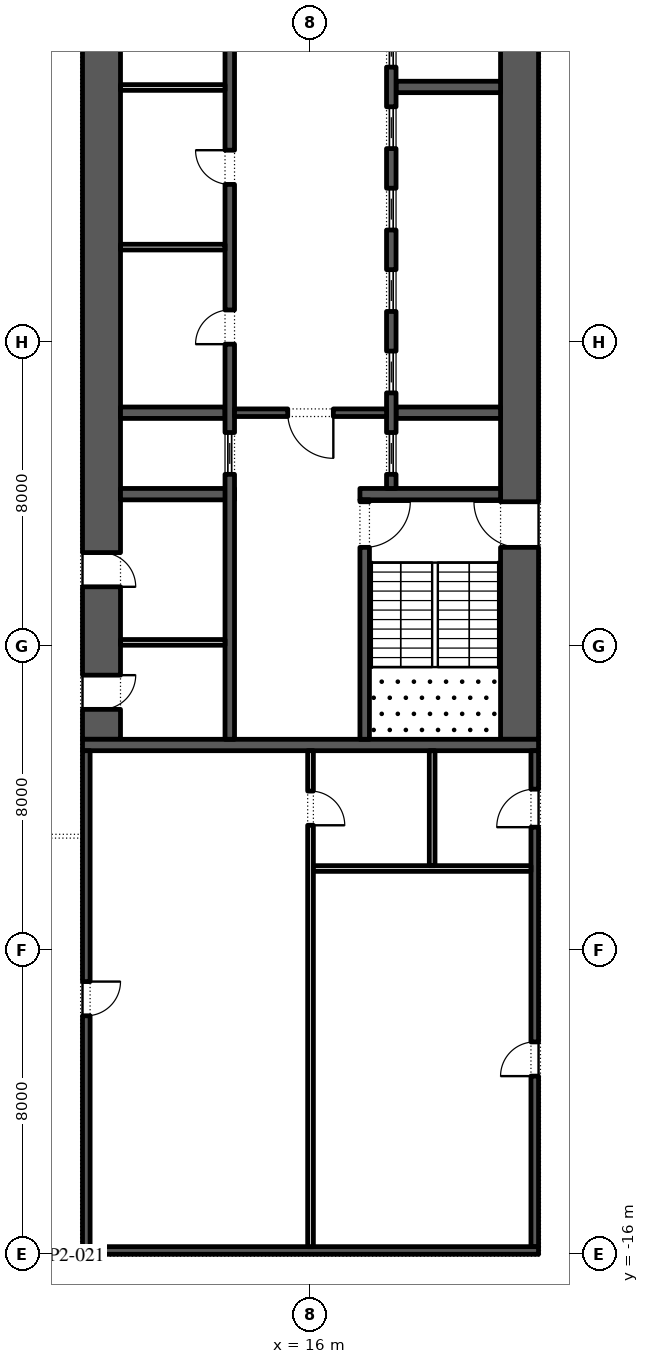
"""IFC4 building model, lengths in metres.
Left out: names, types, materials, properties, quantities, classifications, styles, units other than length and angle.
Written with IfcOpenShell. Run it as: python <this file> out.ifc"""

import sys

from ifc_helpers import new_model, si_unit, direction, frame, frame_2d, origin, place, context, subcontext, project, spatial, rectangle, extrude, element, fill, save


model = new_model("IFC4")
c1 = context("Model", 3, precision=1e-05, world=origin(), true_north=direction((0.0, 1.0)))
c2 = subcontext(c1, "Body", "Model", "MODEL_VIEW")
j1 = project(units=[si_unit("LENGTHUNIT", "METRE"), si_unit("PLANEANGLEUNIT", "RADIAN")], contexts=[c1])
p1 = place(None, origin())
s1 = spatial("IfcSite", under=j1, at=p1, CompositionType="ELEMENT")
p2 = place(p1, origin())
s2 = spatial("IfcBuilding", under=s1, at=p2, CompositionType="ELEMENT")
p3 = place(p2, frame((0.0, 0.0, 81.6)))
s3 = spatial("IfcBuildingStorey", under=s2, at=p3, CompositionType="ELEMENT", Elevation=81.6)
p4 = place(p3, frame((21.5, -2.45, 0.0), z_axis=(0.0, 0.0, 1.0), x_axis=(0.0, 1.0, 0.0)))
e1 = element("IfcWall", 1, at=p4, inside=s3, PredefinedType="SHEAR", context=c2, shape_type="SweptSolid", body=[
    extrude(rectangle(XDim=27.9, YDim=1.0, at=frame_2d((13.95, 0.0))), origin(), (0.0, 0.0, 1.0), 4.0),
])
p5 = place(p4, frame((5.05, 0.0, 0.0)))
e2 = element("IfcOpeningElement", 2, at=p5, cuts=e1, PredefinedType="OPENING", context=c2, shape_type="SweptSolid", body=[
    extrude(rectangle(XDim=1.2, YDim=2.1, at=frame_2d((0.6, 1.05))), frame((0.0, 0.51, 0.0), z_axis=(0.0, -1.0, 0.0), x_axis=(1.0, 0.0, 0.0)), (0.0, 0.0, 1.0), 1.02),
])
p6 = place(p4, frame((21.65, 0.0, 0.0)))
e3 = element("IfcOpeningElement", 3, at=p6, cuts=e1, PredefinedType="OPENING", context=c2, shape_type="SweptSolid", body=[
    extrude(rectangle(XDim=1.2, YDim=2.1, at=frame_2d((0.6, 1.05))), frame((0.0, 0.51, 0.0), z_axis=(0.0, -1.0, 0.0), x_axis=(1.0, 0.0, 0.0)), (0.0, 0.0, 1.0), 1.02),
])
p7 = place(p3, frame((10.5, -2.45, 0.0), z_axis=(0.0, 0.0, 1.0), x_axis=(0.0, 1.0, 0.0)))
e4 = element("IfcWall", 4, at=p7, inside=s3, PredefinedType="SHEAR", context=c2, shape_type="SweptSolid", body=[
    extrude(rectangle(XDim=27.9, YDim=1.0, at=frame_2d((13.95, 0.0))), origin(), (0.0, 0.0, 1.0), 4.0),
])
p8 = place(p7, frame((23.65, 0.0, 0.0)))
e5 = element("IfcOpeningElement", 5, at=p8, cuts=e4, PredefinedType="OPENING", context=c2, shape_type="SweptSolid", body=[
    extrude(rectangle(XDim=2.4, YDim=2.1, at=frame_2d((1.2, 1.05))), frame((0.0, 0.51, 0.0), z_axis=(0.0, -1.0, 0.0), x_axis=(1.0, 0.0, 0.0)), (0.0, 0.0, 1.0), 1.02),
])
p9 = place(p7, frame((0.788, 0.0, 0.0)))
e6 = element("IfcOpeningElement", 6, at=p9, cuts=e4, PredefinedType="OPENING", context=c2, shape_type="SweptSolid", body=[
    extrude(rectangle(XDim=0.9, YDim=2.1, at=frame_2d((0.45, 1.05))), frame((0.0, 0.51, 0.0), z_axis=(0.0, -1.0, 0.0), x_axis=(1.0, 0.0, 0.0)), (0.0, 0.0, 1.0), 1.02),
])
p10 = place(p7, frame((4.012, 0.0, 0.0)))
e7 = element("IfcOpeningElement", 7, at=p10, cuts=e4, PredefinedType="OPENING", context=c2, shape_type="SweptSolid", body=[
    extrude(rectangle(XDim=0.9, YDim=2.1, at=frame_2d((0.45, 1.05))), frame((0.0, 0.51, 0.0), z_axis=(0.0, -1.0, 0.0), x_axis=(1.0, 0.0, 0.0)), (0.0, 0.0, 1.0), 1.02),
])
p11 = place(p3, frame((10.0, -2.6, 0.0), z_axis=(0.0, 0.0, 1.0), x_axis=(1.0, 0.0, 0.0)))
e8 = element("IfcWall", 8, at=p11, inside=s3, PredefinedType="SHEAR", context=c2, shape_type="SweptSolid", body=[
    extrude(rectangle(XDim=12.0, YDim=0.3, at=frame_2d((6.0, 0.0))), origin(), (0.0, 0.0, 1.0), 4.0),
])
p12 = place(p3, frame((17.3, 4.0, 0.0), z_axis=(0.0, 0.0, 1.0), x_axis=(1.0, 0.0, 0.0)))
e9 = element("IfcWall", 9, at=p12, inside=s3, PredefinedType="SHEAR", context=c2, shape_type="SweptSolid", body=[
    extrude(rectangle(XDim=3.7, YDim=0.3, at=frame_2d((1.85, 0.0))), origin(), (0.0, 0.0, 1.0), 4.0),
])
p13 = place(p3, frame((17.425, -2.45, 0.0), z_axis=(0.0, 0.0, 1.0), x_axis=(0.0, 1.0, 0.0)))
e10 = element("IfcWall", 10, at=p13, inside=s3, PredefinedType="SHEAR", context=c2, shape_type="SweptSolid", body=[
    extrude(rectangle(XDim=6.3, YDim=0.25, at=frame_2d((3.15, 0.0))), origin(), (0.0, 0.0, 1.0), 4.0),
])
p14 = place(p13, frame((5.05, 0.0, 0.0)))
e11 = element("IfcOpeningElement", 11, at=p14, cuts=e10, PredefinedType="OPENING", context=c2, shape_type="SweptSolid", body=[
    extrude(rectangle(XDim=1.2, YDim=2.1, at=frame_2d((0.6, 1.05))), frame((0.0, 0.135, 0.0), z_axis=(0.0, -1.0, 0.0), x_axis=(1.0, 0.0, 0.0)), (0.0, 0.0, 1.0), 0.27),
])
for number, where, z_axis, x_axis in (
    (12, (18.25, 6.143, 0.0), (0.0, 0.0, 1.0), (1.0, 0.0, 0.0)),
    (13, (18.25, 14.714, 0.0), (0.0, 0.0, 1.0), (1.0, 0.0, 0.0)),
):
    element("IfcWall", number, at=place(p3, frame(where, z_axis=z_axis, x_axis=x_axis)), inside=s3, PredefinedType="SHEAR", context=c2, shape_type="SweptSolid", body=[
        extrude(rectangle(XDim=2.75, YDim=0.3, at=frame_2d((1.375, 0.0))), origin(), (0.0, 0.0, 1.0), 4.0),
    ])
p15 = place(p3, frame((18.125, 4.15, 0.0), z_axis=(0.0, 0.0, 1.0), x_axis=(0.0, 1.0, 0.0)))
e14 = element("IfcWall", 14, at=p15, inside=s3, PredefinedType="SHEAR", context=c2, shape_type="SweptSolid", body=[
    extrude(rectangle(XDim=14.7, YDim=0.25, at=frame_2d((7.35, 0.0))), origin(), (0.0, 0.0, 1.0), 4.0),
])
p16 = place(p15, frame((0.371, 0.0, 0.0)))
e15 = element("IfcOpeningElement", 15, at=p16, cuts=e14, PredefinedType="OPENING", context=c2, shape_type="SweptSolid", body=[
    extrude(rectangle(XDim=1.1, YDim=2.1, at=frame_2d((0.55, 1.05))), frame((0.0, 0.135, 0.0), z_axis=(0.0, -1.0, 0.0), x_axis=(1.0, 0.0, 0.0)), (0.0, 0.0, 1.0), 0.27),
])
p17 = place(p15, frame((2.514, 0.0, 0.0)))
e16 = element("IfcOpeningElement", 16, at=p17, cuts=e14, PredefinedType="OPENING", context=c2, shape_type="SweptSolid", body=[
    extrude(rectangle(XDim=1.1, YDim=2.1, at=frame_2d((0.55, 1.05))), frame((0.0, 0.135, 0.0), z_axis=(0.0, -1.0, 0.0), x_axis=(1.0, 0.0, 0.0)), (0.0, 0.0, 1.0), 0.27),
])
p18 = place(p15, frame((4.657, 0.0, 0.0)))
e17 = element("IfcOpeningElement", 17, at=p18, cuts=e14, PredefinedType="OPENING", context=c2, shape_type="SweptSolid", body=[
    extrude(rectangle(XDim=1.1, YDim=2.1, at=frame_2d((0.55, 1.05))), frame((0.0, 0.135, 0.0), z_axis=(0.0, -1.0, 0.0), x_axis=(1.0, 0.0, 0.0)), (0.0, 0.0, 1.0), 0.27),
])
p19 = place(p15, frame((6.8, 0.0, 0.0)))
e18 = element("IfcOpeningElement", 18, at=p19, cuts=e14, PredefinedType="OPENING", context=c2, shape_type="SweptSolid", body=[
    extrude(rectangle(XDim=1.1, YDim=2.1, at=frame_2d((0.55, 1.05))), frame((0.0, 0.135, 0.0), z_axis=(0.0, -1.0, 0.0), x_axis=(1.0, 0.0, 0.0)), (0.0, 0.0, 1.0), 0.27),
])
p20 = place(p15, frame((8.943, 0.0, 0.0)))
e19 = element("IfcOpeningElement", 19, at=p20, cuts=e14, PredefinedType="OPENING", context=c2, shape_type="SweptSolid", body=[
    extrude(rectangle(XDim=1.1, YDim=2.1, at=frame_2d((0.55, 1.05))), frame((0.0, 0.135, 0.0), z_axis=(0.0, -1.0, 0.0), x_axis=(1.0, 0.0, 0.0)), (0.0, 0.0, 1.0), 0.27),
])
p21 = place(p15, frame((11.086, 0.0, 0.0)))
e20 = element("IfcOpeningElement", 20, at=p21, cuts=e14, PredefinedType="OPENING", context=c2, shape_type="SweptSolid", body=[
    extrude(rectangle(XDim=1.1, YDim=2.1, at=frame_2d((0.55, 1.05))), frame((0.0, 0.135, 0.0), z_axis=(0.0, -1.0, 0.0), x_axis=(1.0, 0.0, 0.0)), (0.0, 0.0, 1.0), 0.27),
])
p22 = place(p15, frame((13.229, 0.0, 0.0)))
e21 = element("IfcOpeningElement", 21, at=p22, cuts=e14, PredefinedType="OPENING", context=c2, shape_type="SweptSolid", body=[
    extrude(rectangle(XDim=1.1, YDim=2.1, at=frame_2d((0.55, 1.05))), frame((0.0, 0.135, 0.0), z_axis=(0.0, -1.0, 0.0), x_axis=(1.0, 0.0, 0.0)), (0.0, 0.0, 1.0), 0.27),
])
p23 = place(p3, frame((11.0, 4.0, 0.0), z_axis=(0.0, 0.0, 1.0), x_axis=(1.0, 0.0, 0.0)))
e22 = element("IfcWall", 22, at=p23, inside=s3, PredefinedType="SHEAR", context=c2, shape_type="SweptSolid", body=[
    extrude(rectangle(XDim=3.0, YDim=0.3, at=frame_2d((1.5, 0.0))), origin(), (0.0, 0.0, 1.0), 4.0),
])
p24 = place(p3, frame((11.0, 6.143, 0.0), z_axis=(0.0, 0.0, 1.0), x_axis=(1.0, 0.0, 0.0)))
e23 = element("IfcWall", 23, at=p24, inside=s3, PredefinedType="SHEAR", context=c2, shape_type="SweptSolid", body=[
    extrude(rectangle(XDim=2.75, YDim=0.3, at=frame_2d((1.375, 0.0))), origin(), (0.0, 0.0, 1.0), 4.0),
])
p25 = place(p3, frame((13.875, -2.45, 0.0), z_axis=(0.0, 0.0, 1.0), x_axis=(0.0, 1.0, 0.0)))
e24 = element("IfcWall", 24, at=p25, inside=s3, PredefinedType="SHEAR", context=c2, shape_type="SweptSolid", body=[
    extrude(rectangle(XDim=21.3, YDim=0.25, at=frame_2d((10.65, 0.0))), origin(), (0.0, 0.0, 1.0), 4.0),
])
p26 = place(p25, frame((10.396, 0.0, 0.0)))
e25 = element("IfcOpeningElement", 25, at=p26, cuts=e24, PredefinedType="OPENING", context=c2, shape_type="SweptSolid", body=[
    extrude(rectangle(XDim=0.9, YDim=2.1, at=frame_2d((0.45, 1.05))), frame((0.0, 0.135, 0.0), z_axis=(0.0, -1.0, 0.0), x_axis=(1.0, 0.0, 0.0)), (0.0, 0.0, 1.0), 0.27),
])
p27 = place(p25, frame((14.6, 0.0, 0.0)))
e26 = element("IfcOpeningElement", 26, at=p27, cuts=e24, PredefinedType="OPENING", context=c2, shape_type="SweptSolid", body=[
    extrude(rectangle(XDim=0.9, YDim=2.1, at=frame_2d((0.45, 1.05))), frame((0.0, 0.135, 0.0), z_axis=(0.0, -1.0, 0.0), x_axis=(1.0, 0.0, 0.0)), (0.0, 0.0, 1.0), 0.27),
])
p28 = place(p25, frame((18.775, 0.0, 0.0)))
e27 = element("IfcOpeningElement", 27, at=p28, cuts=e24, PredefinedType="OPENING", context=c2, shape_type="SweptSolid", body=[
    extrude(rectangle(XDim=0.9, YDim=2.1, at=frame_2d((0.45, 1.05))), frame((0.0, 0.135, 0.0), z_axis=(0.0, -1.0, 0.0), x_axis=(1.0, 0.0, 0.0)), (0.0, 0.0, 1.0), 0.27),
])
p29 = place(p25, frame((6.971, 0.0, 0.0)))
e28 = element("IfcOpeningElement", 28, at=p29, cuts=e24, PredefinedType="OPENING", context=c2, shape_type="SweptSolid", body=[
    extrude(rectangle(XDim=1.1, YDim=2.1, at=frame_2d((0.55, 1.05))), frame((0.0, 0.135, 0.0), z_axis=(0.0, -1.0, 0.0), x_axis=(1.0, 0.0, 0.0)), (0.0, 0.0, 1.0), 0.27),
])
for number, where, z_axis, x_axis in (
    (29, (11.0, 10.5, 0.0), (0.0, 0.0, 1.0), (1.0, 0.0, 0.0)),
    (30, (11.0, 14.7, 0.0), (0.0, 0.0, 1.0), (1.0, 0.0, 0.0)),
):
    element("IfcWall", number, at=place(p3, frame(where, z_axis=z_axis, x_axis=x_axis)), inside=s3, PredefinedType="PARTITIONING", context=c2, shape_type="SweptSolid", body=[
        extrude(rectangle(XDim=2.75, YDim=0.15, at=frame_2d((1.375, 0.0))), origin(), (0.0, 0.0, 1.0), 4.0),
    ])
p30 = place(p3, frame((14.0, 6.143, 0.0), z_axis=(0.0, 0.0, 1.0), x_axis=(1.0, 0.0, 0.0)))
e31 = element("IfcWall", 31, at=p30, inside=s3, PredefinedType="SHEAR", context=c2, shape_type="SweptSolid", body=[
    extrude(rectangle(XDim=4.0, YDim=0.2, at=frame_2d((2.0, 0.0))), origin(), (0.0, 0.0, 1.0), 4.0),
])
p31 = place(p30, frame((1.4, 0.0, 0.0)))
e32 = element("IfcOpeningElement", 32, at=p31, cuts=e31, PredefinedType="OPENING", context=c2, shape_type="SweptSolid", body=[
    extrude(rectangle(XDim=1.2, YDim=2.1, at=frame_2d((0.6, 1.05))), frame((0.0, 0.11, 0.0), z_axis=(0.0, -1.0, 0.0), x_axis=(1.0, 0.0, 0.0)), (0.0, 0.0, 1.0), 0.22),
])
p32 = place(p3, frame((11.0, 0.1, 0.0), z_axis=(0.0, 0.0, 1.0), x_axis=(1.0, 0.0, 0.0)))
e33 = element("IfcWall", 33, at=p32, inside=s3, PredefinedType="PARTITIONING", context=c2, shape_type="SweptSolid", body=[
    extrude(rectangle(XDim=2.75, YDim=0.15, at=frame_2d((1.375, 0.0))), origin(), (0.0, 0.0, 1.0), 4.0),
])
p33 = place(p3, frame((21.9, -15.8, 0.0), z_axis=(0.0, 0.0, 1.0), x_axis=(0.0, 1.0, 0.0)))
e34 = element("IfcWall", 34, at=p33, inside=s3, PredefinedType="SHEAR", context=c2, shape_type="SweptSolid", body=[
    extrude(rectangle(XDim=13.05, YDim=0.2, at=frame_2d((6.525, 0.0))), origin(), (0.0, 0.0, 1.0), 4.0),
])
p34 = place(p33, frame((4.488, 0.0, 0.0)))
e35 = element("IfcOpeningElement", 35, at=p34, cuts=e34, PredefinedType="OPENING", context=c2, shape_type="SweptSolid", body=[
    extrude(rectangle(XDim=0.9, YDim=2.1, at=frame_2d((0.45, 1.05))), frame((0.0, 0.11, 0.0), z_axis=(0.0, -1.0, 0.0), x_axis=(1.0, 0.0, 0.0)), (0.0, 0.0, 1.0), 0.22),
])
p35 = place(p33, frame((11.038, 0.0, 0.0)))
e36 = element("IfcOpeningElement", 36, at=p35, cuts=e34, PredefinedType="OPENING", context=c2, shape_type="SweptSolid", body=[
    extrude(rectangle(XDim=1.0, YDim=2.1, at=frame_2d((0.5, 1.05))), frame((0.0, 0.11, 0.0), z_axis=(0.0, -1.0, 0.0), x_axis=(1.0, 0.0, 0.0)), (0.0, 0.0, 1.0), 0.22),
])
p36 = place(p3, frame((10.1, -15.8, 0.0), z_axis=(0.0, 0.0, 1.0), x_axis=(0.0, 1.0, 0.0)))
e37 = element("IfcWall", 37, at=p36, inside=s3, PredefinedType="SHEAR", context=c2, shape_type="SweptSolid", body=[
    extrude(rectangle(XDim=13.05, YDim=0.2, at=frame_2d((6.525, 0.0))), origin(), (0.0, 0.0, 1.0), 4.0),
])
p37 = place(p36, frame((6.075, 0.0, 0.0)))
e38 = element("IfcOpeningElement", 38, at=p37, cuts=e37, PredefinedType="OPENING", context=c2, shape_type="SweptSolid", body=[
    extrude(rectangle(XDim=0.9, YDim=2.1, at=frame_2d((0.45, 1.05))), frame((0.0, 0.11, 0.0), z_axis=(0.0, -1.0, 0.0), x_axis=(1.0, 0.0, 0.0)), (0.0, 0.0, 1.0), 0.22),
])
p38 = place(p3, frame((10.0, -15.9, 0.0), z_axis=(0.0, 0.0, 1.0), x_axis=(1.0, 0.0, 0.0)))
e39 = element("IfcWall", 39, at=p38, inside=s3, PredefinedType="SHEAR", context=c2, shape_type="SweptSolid", body=[
    extrude(rectangle(XDim=12.0, YDim=0.2, at=frame_2d((6.0, 0.0))), origin(), (0.0, 0.0, 1.0), 4.0),
])
p39 = place(p3, frame((16.0, -15.8, 0.0), z_axis=(0.0, 0.0, 1.0), x_axis=(0.0, 1.0, 0.0)))
e40 = element("IfcWall", 40, at=p39, inside=s3, PredefinedType="PARTITIONING", context=c2, shape_type="SweptSolid", body=[
    extrude(rectangle(XDim=13.05, YDim=0.15, at=frame_2d((6.525, 0.0))), origin(), (0.0, 0.0, 1.0), 4.0),
])
p40 = place(p39, frame((11.087, 0.0, 0.0)))
e41 = element("IfcOpeningElement", 41, at=p40, cuts=e40, PredefinedType="OPENING", context=c2, shape_type="SweptSolid", body=[
    extrude(rectangle(XDim=0.9, YDim=2.1, at=frame_2d((0.45, 1.05))), frame((0.0, 0.085, 0.0), z_axis=(0.0, -1.0, 0.0), x_axis=(1.0, 0.0, 0.0)), (0.0, 0.0, 1.0), 0.17),
])
p41 = place(p3, frame((16.075, -5.85, 0.0), z_axis=(0.0, 0.0, 1.0), x_axis=(1.0, 0.0, 0.0)))
e42 = element("IfcWall", 42, at=p41, inside=s3, PredefinedType="PARTITIONING", context=c2, shape_type="SweptSolid", body=[
    extrude(rectangle(XDim=5.725, YDim=0.15, at=frame_2d((2.863, 0.0))), origin(), (0.0, 0.0, 1.0), 4.0),
])
p42 = place(p3, frame((19.2, -5.775, 0.0), z_axis=(0.0, 0.0, 1.0), x_axis=(0.0, 1.0, 0.0)))
e43 = element("IfcWall", 43, at=p42, inside=s3, PredefinedType="PARTITIONING", context=c2, shape_type="SweptSolid", body=[
    extrude(rectangle(XDim=3.025, YDim=0.15, at=frame_2d((1.512, 0.0))), origin(), (0.0, 0.0, 1.0), 4.0),
])
p43 = place(p16, origin())
e44 = element("IfcDoor", 44, at=p43, inside=s3, OperationType="SLIDING_TO_LEFT", PredefinedType="DOOR", context=c2, shape_type="SweptSolid", body=[
    extrude(rectangle(XDim=1.1, YDim=2.1, at=frame_2d((0.55, 1.05))), frame((0.0, 0.025, 0.0), z_axis=(0.0, -1.0, 0.0), x_axis=(1.0, 0.0, 0.0)), (0.0, 0.0, 1.0), 0.05),
])
fill(e15, e44)
p44 = place(p17, origin())
e45 = element("IfcDoor", 45, at=p44, inside=s3, OperationType="SLIDING_TO_LEFT", PredefinedType="DOOR", context=c2, shape_type="SweptSolid", body=[
    extrude(rectangle(XDim=1.1, YDim=2.1, at=frame_2d((0.55, 1.05))), frame((0.0, 0.025, 0.0), z_axis=(0.0, -1.0, 0.0), x_axis=(1.0, 0.0, 0.0)), (0.0, 0.0, 1.0), 0.05),
])
fill(e16, e45)
p45 = place(p18, origin())
e46 = element("IfcDoor", 46, at=p45, inside=s3, OperationType="SLIDING_TO_LEFT", PredefinedType="DOOR", context=c2, shape_type="SweptSolid", body=[
    extrude(rectangle(XDim=1.1, YDim=2.1, at=frame_2d((0.55, 1.05))), frame((0.0, 0.025, 0.0), z_axis=(0.0, -1.0, 0.0), x_axis=(1.0, 0.0, 0.0)), (0.0, 0.0, 1.0), 0.05),
])
fill(e17, e46)
p46 = place(p19, origin())
e47 = element("IfcDoor", 47, at=p46, inside=s3, OperationType="SLIDING_TO_LEFT", PredefinedType="DOOR", context=c2, shape_type="SweptSolid", body=[
    extrude(rectangle(XDim=1.1, YDim=2.1, at=frame_2d((0.55, 1.05))), frame((0.0, 0.025, 0.0), z_axis=(0.0, -1.0, 0.0), x_axis=(1.0, 0.0, 0.0)), (0.0, 0.0, 1.0), 0.05),
])
fill(e18, e47)
p47 = place(p20, origin())
e48 = element("IfcDoor", 48, at=p47, inside=s3, OperationType="SLIDING_TO_LEFT", PredefinedType="DOOR", context=c2, shape_type="SweptSolid", body=[
    extrude(rectangle(XDim=1.1, YDim=2.1, at=frame_2d((0.55, 1.05))), frame((0.0, 0.025, 0.0), z_axis=(0.0, -1.0, 0.0), x_axis=(1.0, 0.0, 0.0)), (0.0, 0.0, 1.0), 0.05),
])
fill(e19, e48)
p48 = place(p21, origin())
e49 = element("IfcDoor", 49, at=p48, inside=s3, OperationType="SLIDING_TO_LEFT", PredefinedType="DOOR", context=c2, shape_type="SweptSolid", body=[
    extrude(rectangle(XDim=1.1, YDim=2.1, at=frame_2d((0.55, 1.05))), frame((0.0, 0.025, 0.0), z_axis=(0.0, -1.0, 0.0), x_axis=(1.0, 0.0, 0.0)), (0.0, 0.0, 1.0), 0.05),
])
fill(e20, e49)
p49 = place(p26, origin())
e50 = element("IfcDoor", 50, at=p49, inside=s3, OperationType="SINGLE_SWING_RIGHT", PredefinedType="DOOR", context=c2, shape_type="SweptSolid", body=[
    extrude(rectangle(XDim=0.9, YDim=2.1, at=frame_2d((0.45, 1.05))), frame((0.0, 0.125, 0.0), z_axis=(0.0, -1.0, 0.0), x_axis=(1.0, 0.0, 0.0)), (0.0, 0.0, 1.0), 0.05),
])
fill(e25, e50)
p50 = place(p27, origin())
e51 = element("IfcDoor", 51, at=p50, inside=s3, OperationType="SINGLE_SWING_LEFT", PredefinedType="DOOR", context=c2, shape_type="SweptSolid", body=[
    extrude(rectangle(XDim=0.9, YDim=2.1, at=frame_2d((0.45, 1.05))), frame((0.0, 0.125, 0.0), z_axis=(0.0, -1.0, 0.0), x_axis=(1.0, 0.0, 0.0)), (0.0, 0.0, 1.0), 0.05),
])
fill(e26, e51)
p51 = place(p29, origin())
e52 = element("IfcDoor", 52, at=p51, inside=s3, OperationType="SLIDING_TO_LEFT", PredefinedType="DOOR", context=c2, shape_type="SweptSolid", body=[
    extrude(rectangle(XDim=1.1, YDim=2.1, at=frame_2d((0.55, 1.05))), frame((0.0, 0.025, 0.0), z_axis=(0.0, -1.0, 0.0), x_axis=(1.0, 0.0, 0.0)), (0.0, 0.0, 1.0), 0.05),
])
fill(e28, e52)
p52 = place(p31, frame((1.2, 0.0, 0.0), z_axis=(0.0, 0.0, 1.0), x_axis=(-1.0, 0.0, 0.0)))
e53 = element("IfcDoor", 53, at=p52, inside=s3, OperationType="SINGLE_SWING_RIGHT", PredefinedType="DOOR", context=c2, shape_type="SweptSolid", body=[
    extrude(rectangle(XDim=1.2, YDim=2.1, at=frame_2d((0.6, 1.05))), frame((0.0, 0.025, 0.0), z_axis=(0.0, -1.0, 0.0), x_axis=(1.0, 0.0, 0.0)), (0.0, 0.0, 1.0), 0.05),
])
fill(e32, e53)
p53 = place(p14, frame((1.2, 0.0, 0.0), z_axis=(0.0, 0.0, 1.0), x_axis=(-1.0, 0.0, 0.0)))
e54 = element("IfcDoor", 54, at=p53, inside=s3, OperationType="SINGLE_SWING_RIGHT", PredefinedType="DOOR", context=c2, shape_type="SweptSolid", body=[
    extrude(rectangle(XDim=1.2, YDim=2.1, at=frame_2d((0.6, 1.05))), frame((0.0, 0.025, 0.0), z_axis=(0.0, -1.0, 0.0), x_axis=(1.0, 0.0, 0.0)), (0.0, 0.0, 1.0), 0.05),
])
fill(e11, e54)
p54 = place(p5, origin())
e55 = element("IfcDoor", 55, at=p54, inside=s3, OperationType="SINGLE_SWING_LEFT", PredefinedType="DOOR", context=c2, shape_type="SweptSolid", body=[
    extrude(rectangle(XDim=1.2, YDim=2.1, at=frame_2d((0.6, 1.05))), frame((0.0, 0.025, 0.0), z_axis=(0.0, -1.0, 0.0), x_axis=(1.0, 0.0, 0.0)), (0.0, 0.0, 1.0), 0.05),
])
fill(e2, e55)
p55 = place(p9, frame((0.9, -0.95, 0.0), z_axis=(0.0, 0.0, 1.0), x_axis=(-1.0, 0.0, 0.0)))
e56 = element("IfcDoor", 56, at=p55, inside=s3, OperationType="SINGLE_SWING_RIGHT", PredefinedType="DOOR", context=c2, shape_type="SweptSolid", body=[
    extrude(rectangle(XDim=0.9, YDim=2.1, at=frame_2d((0.45, 1.05))), frame((0.0, -0.45, 0.0), z_axis=(0.0, -1.0, 0.0), x_axis=(1.0, 0.0, 0.0)), (0.0, 0.0, 1.0), 0.05),
])
fill(e6, e56)
p56 = place(p10, frame((0.9, -0.95, 0.0), z_axis=(0.0, 0.0, 1.0), x_axis=(-1.0, 0.0, 0.0)))
e57 = element("IfcDoor", 57, at=p56, inside=s3, OperationType="SINGLE_SWING_LEFT", PredefinedType="DOOR", context=c2, shape_type="SweptSolid", body=[
    extrude(rectangle(XDim=0.9, YDim=2.1, at=frame_2d((0.45, 1.05))), frame((0.0, -0.45, 0.0), z_axis=(0.0, -1.0, 0.0), x_axis=(1.0, 0.0, 0.0)), (0.0, 0.0, 1.0), 0.05),
])
fill(e7, e57)
p57 = place(p34, origin())
e58 = element("IfcDoor", 58, at=p57, inside=s3, OperationType="SINGLE_SWING_RIGHT", PredefinedType="DOOR", context=c2, shape_type="SweptSolid", body=[
    extrude(rectangle(XDim=0.9, YDim=2.1, at=frame_2d((0.45, 1.05))), frame((0.0, 0.1, 0.0), z_axis=(0.0, -1.0, 0.0), x_axis=(1.0, 0.0, 0.0)), (0.0, 0.0, 1.0), 0.05),
])
fill(e35, e58)
p58 = place(p35, origin())
e59 = element("IfcDoor", 59, at=p58, inside=s3, OperationType="SINGLE_SWING_RIGHT", PredefinedType="DOOR", context=c2, shape_type="SweptSolid", body=[
    extrude(rectangle(XDim=1.0, YDim=2.1, at=frame_2d((0.5, 1.05))), frame((0.0, 0.1, 0.0), z_axis=(0.0, -1.0, 0.0), x_axis=(1.0, 0.0, 0.0)), (0.0, 0.0, 1.0), 0.05),
])
fill(e36, e59)
p59 = place(p40, frame((0.9, 0.0, 0.0), z_axis=(0.0, 0.0, 1.0), x_axis=(-1.0, 0.0, 0.0)))
e60 = element("IfcDoor", 60, at=p59, inside=s3, OperationType="SINGLE_SWING_LEFT", PredefinedType="DOOR", context=c2, shape_type="SweptSolid", body=[
    extrude(rectangle(XDim=0.9, YDim=2.1, at=frame_2d((0.45, 1.05))), frame((0.0, 0.025, 0.0), z_axis=(0.0, -1.0, 0.0), x_axis=(1.0, 0.0, 0.0)), (0.0, 0.0, 1.0), 0.05),
])
fill(e41, e60)
p60 = place(p37, frame((0.9, -0.15, 0.0), z_axis=(0.0, 0.0, 1.0), x_axis=(-1.0, 0.0, 0.0)))
e61 = element("IfcDoor", 61, at=p60, inside=s3, OperationType="SINGLE_SWING_RIGHT", PredefinedType="DOOR", context=c2, shape_type="SweptSolid", body=[
    extrude(rectangle(XDim=0.9, YDim=2.1, at=frame_2d((0.45, 1.05))), frame((0.0, -0.05, 0.0), z_axis=(0.0, -1.0, 0.0), x_axis=(1.0, 0.0, 0.0)), (0.0, 0.0, 1.0), 0.05),
])
fill(e38, e61)
save(model, sys.argv[1])
